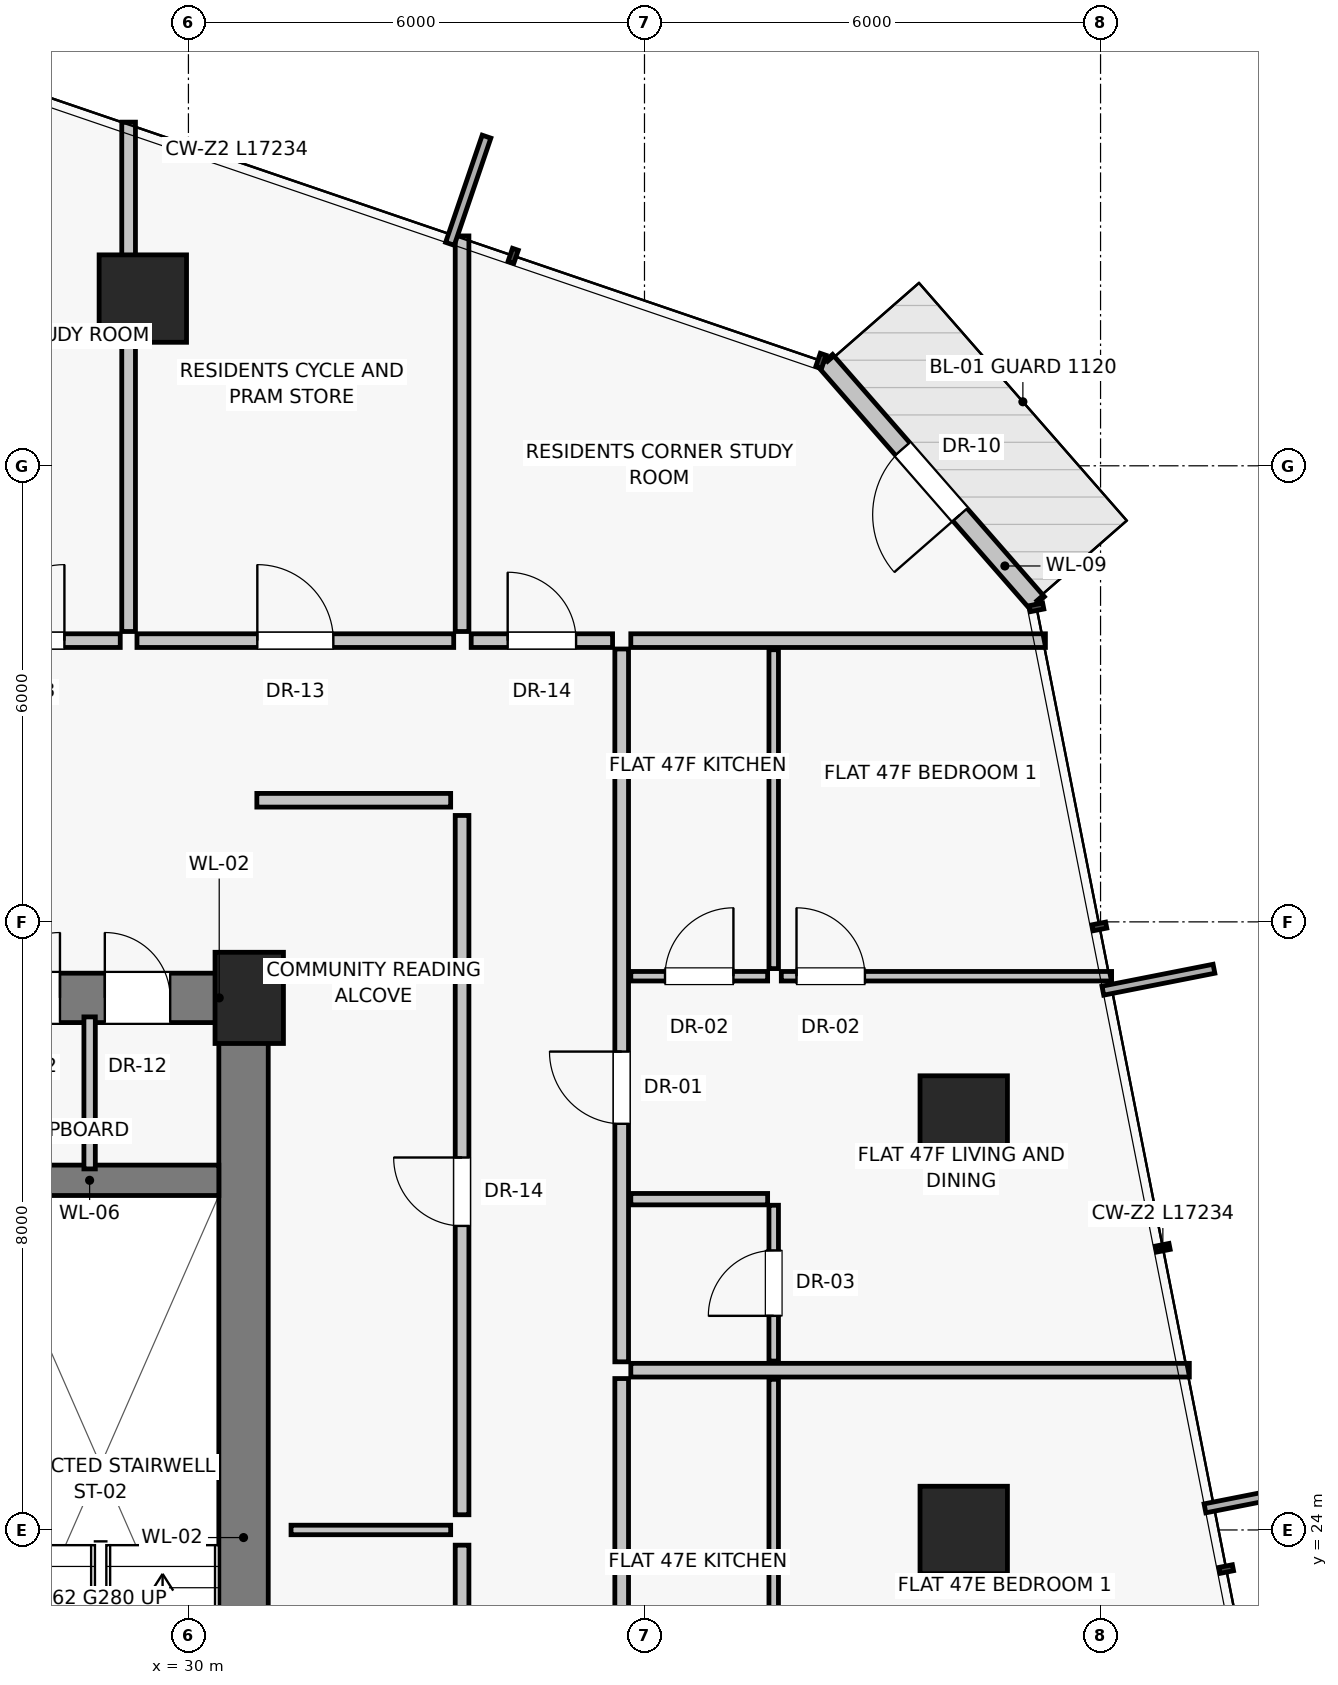
"""IFC4 building model, lengths in metres.
Left out: names, types, materials, properties, quantities, classifications, styles, units other than length and angle.
Written with IfcOpenShell. Run it as: python <this file> out.ifc"""

import sys

from ifc_helpers import new_model, si_unit, direction, frame, frame_2d, origin, origin_2d, place, context, subcontext, project, spatial, rectangle, extrude, source, transform, mapped, element, fill, save


model = new_model("IFC4")
c1 = context("Model", 3, precision=1e-05, world=origin(), true_north=direction((0.0, 1.0)))
c2 = subcontext(c1, "Body", "Model", "MODEL_VIEW")
j1 = project(units=[si_unit("LENGTHUNIT", "METRE"), si_unit("PLANEANGLEUNIT", "RADIAN")], contexts=[c1])
p1 = place(None, origin())
s1 = spatial("IfcSite", under=j1, at=p1, CompositionType="ELEMENT")
p2 = place(p1, origin())
s2 = spatial("IfcBuilding", under=s1, at=p2, CompositionType="ELEMENT")
p3 = place(p2, frame((0.0, 0.0, 166.3)))
s3 = spatial("IfcBuildingStorey", under=s2, at=p3, CompositionType="ELEMENT", Elevation=166.3)
p4 = place(p3, frame((30.8, 31.0, 0.0), z_axis=(0.0, 0.0, 1.0), x_axis=(1.0, 0.0, 0.0)))
e1 = element("IfcColumn", 1, at=p4, inside=s3, PredefinedType="PILASTER", context=c2, shape_type="SweptSolid", body=[
    extrude(rectangle(XDim=0.9, YDim=1.2, at=origin_2d()), origin(), (0.0, 0.0, 1.0), 3.25),
])
for number, where, z_axis, x_axis in (
    (2, (40.2, 24.0, 0.0), (0.0, 0.0, 1.0), (1.0, 0.0, 0.0)),
    (3, (40.2, 29.4, 0.0), (0.0, 0.0, 1.0), (1.0, 0.0, 0.0)),
    (4, (29.4, 40.2, 0.0), (0.0, 0.0, 1.0), (1.0, 0.0, 0.0)),
):
    element("IfcColumn", number, at=place(p3, frame(where, z_axis=z_axis, x_axis=x_axis)), inside=s3, PredefinedType="COLUMN", context=c2, shape_type="SweptSolid", body=[
        extrude(rectangle(XDim=1.15, YDim=1.15, at=origin_2d()), origin(), (0.0, 0.0, 1.0), 3.25),
    ])
p5 = place(p3, frame((41.167, 36.196, 0.0), z_axis=(0.0, 0.0, 1.0), x_axis=(-0.658137038382, 0.752898159587, 0.0)))
e5 = element("IfcWall", 5, at=p5, inside=s3, PredefinedType="SOLIDWALL", context=c2, shape_type="SweptSolid", body=[
    extrude(rectangle(XDim=4.233, YDim=0.25, at=frame_2d((2.116, 0.0))), origin(), (0.0, 0.0, 1.0), 2.93),
])
p6 = place(p5, frame((1.542, 0.0, 0.0)))
e6 = element("IfcOpeningElement", 6, at=p6, cuts=e5, PredefinedType="OPENING", context=c2, shape_type="SweptSolid", body=[
    extrude(rectangle(XDim=1.15, YDim=2.25, at=frame_2d((0.575, 1.125))), frame((0.0, 0.135, 0.0), z_axis=(0.0, -1.0, 0.0), x_axis=(1.0, 0.0, 0.0)), (0.0, 0.0, 1.0), 0.27),
])
p7 = place(p3, frame((30.725, 16.8, 0.0), z_axis=(0.0, 0.0, 1.0), x_axis=(0.0, 1.0, 0.0)))
e7 = element("IfcWall", 7, at=p7, inside=s3, PredefinedType="SHEAR", context=c2, shape_type="SweptSolid", body=[
    extrude(rectangle(XDim=14.2, YDim=0.65, at=frame_2d((7.1, 0.0))), origin(), (0.0, 0.0, 1.0), 2.93),
])
p8 = place(p3, frame((27.0, 31.0, 0.0), z_axis=(0.0, 0.0, 1.0), x_axis=(1.0, 0.0, 0.0)))
e8 = element("IfcWall", 8, at=p8, inside=s3, PredefinedType="SHEAR", context=c2, shape_type="SweptSolid", body=[
    extrude(rectangle(XDim=3.8, YDim=0.65, at=frame_2d((1.9, 0.0))), origin(), (0.0, 0.0, 1.0), 2.93),
])
p9 = place(p8, frame((0.45, 0.0, 0.0)))
e9 = element("IfcOpeningElement", 9, at=p9, cuts=e8, PredefinedType="OPENING", context=c2, shape_type="SweptSolid", body=[
    extrude(rectangle(XDim=0.86, YDim=2.01, at=frame_2d((0.43, 1.005))), frame((0.0, 0.335, 0.0), z_axis=(0.0, -1.0, 0.0), x_axis=(1.0, 0.0, 0.0)), (0.0, 0.0, 1.0), 0.67),
])
p10 = place(p8, frame((1.9, 0.0, 0.0)))
e10 = element("IfcOpeningElement", 10, at=p10, cuts=e8, PredefinedType="OPENING", context=c2, shape_type="SweptSolid", body=[
    extrude(rectangle(XDim=0.86, YDim=2.01, at=frame_2d((0.43, 1.005))), frame((0.0, 0.335, 0.0), z_axis=(0.0, -1.0, 0.0), x_axis=(1.0, 0.0, 0.0)), (0.0, 0.0, 1.0), 0.67),
])
p11 = place(p3, frame((27.0, 28.6, 0.0), z_axis=(0.0, 0.0, 1.0), x_axis=(1.0, 0.0, 0.0)))
e11 = element("IfcWall", 11, at=p11, inside=s3, PredefinedType="SHEAR", context=c2, shape_type="SweptSolid", body=[
    extrude(rectangle(XDim=3.4, YDim=0.4, at=frame_2d((1.7, 0.0))), origin(), (0.0, 0.0, 1.0), 2.93),
])
p12 = place(p3, frame((28.7, 28.75, 0.0), z_axis=(0.0, 0.0, 1.0), x_axis=(0.0, 1.0, 0.0)))
e12 = element("IfcWall", 12, at=p12, inside=s3, PredefinedType="PARTITIONING", context=c2, shape_type="SweptSolid", body=[
    extrude(rectangle(XDim=2.0, YDim=0.15, at=frame_2d((1.0, 0.0))), origin(), (0.0, 0.0, 1.0), 2.93),
])
p13 = place(p3, frame((33.6, 14.4, 0.0), z_axis=(0.0, 0.0, 1.0), x_axis=(0.0, 1.0, 0.0)))
e13 = element("IfcWall", 13, at=p13, inside=s3, PredefinedType="PARTITIONING", context=c2, shape_type="SweptSolid", body=[
    extrude(rectangle(XDim=9.4, YDim=0.18, at=frame_2d((4.7, 0.0))), origin(), (0.0, 0.0, 1.0), 2.93),
])
p14 = place(p13, frame((3.8, 0.0, 0.0)))
e14 = element("IfcOpeningElement", 14, at=p14, cuts=e13, PredefinedType="OPENING", context=c2, shape_type="SweptSolid", body=[
    extrude(rectangle(XDim=0.9, YDim=2.01, at=frame_2d((0.45, 1.005))), frame((0.0, 0.1, 0.0), z_axis=(0.0, -1.0, 0.0), x_axis=(1.0, 0.0, 0.0)), (0.0, 0.0, 1.0), 0.2),
])
p15 = place(p3, frame((33.6, 24.2, 0.0), z_axis=(0.0, 0.0, 1.0), x_axis=(0.0, 1.0, 0.0)))
e15 = element("IfcWall", 15, at=p15, inside=s3, PredefinedType="PARTITIONING", context=c2, shape_type="SweptSolid", body=[
    extrude(rectangle(XDim=9.2, YDim=0.18, at=frame_2d((4.6, 0.0))), origin(), (0.0, 0.0, 1.0), 2.93),
])
p16 = place(p15, frame((3.8, 0.0, 0.0)))
e16 = element("IfcOpeningElement", 16, at=p16, cuts=e15, PredefinedType="OPENING", context=c2, shape_type="SweptSolid", body=[
    extrude(rectangle(XDim=0.9, YDim=2.01, at=frame_2d((0.45, 1.005))), frame((0.0, 0.1, 0.0), z_axis=(0.0, -1.0, 0.0), x_axis=(1.0, 0.0, 0.0)), (0.0, 0.0, 1.0), 0.2),
])
p17 = place(p3, frame((31.35, 24.0, 0.0), z_axis=(0.0, 0.0, 1.0), x_axis=(1.0, 0.0, 0.0)))
e17 = element("IfcWall", 17, at=p17, inside=s3, PredefinedType="PARTITIONING", context=c2, shape_type="SweptSolid", body=[
    extrude(rectangle(XDim=2.1, YDim=0.125, at=frame_2d((1.05, 0.0))), origin(), (0.0, 0.0, 1.0), 2.93),
])
p18 = place(p3, frame((30.9, 33.6, 0.0), z_axis=(0.0, 0.0, 1.0), x_axis=(1.0, 0.0, 0.0)))
e18 = element("IfcWall", 18, at=p18, inside=s3, PredefinedType="PARTITIONING", context=c2, shape_type="SweptSolid", body=[
    extrude(rectangle(XDim=2.55, YDim=0.18, at=frame_2d((1.275, 0.0))), origin(), (0.0, 0.0, 1.0), 2.93),
])
p19 = place(p3, frame((33.6, 35.82, 0.0), z_axis=(0.0, 0.0, 1.0), x_axis=(0.0, 1.0, 0.0)))
e19 = element("IfcWall", 19, at=p19, inside=s3, PredefinedType="PARTITIONING", context=c2, shape_type="SweptSolid", body=[
    extrude(rectangle(XDim=5.204, YDim=0.18, at=frame_2d((2.602, 0.0))), origin(), (0.0, 0.0, 1.0), 2.93),
])
p20 = place(p3, frame((26.634, 35.7, 0.0), z_axis=(0.0, 0.0, 1.0), x_axis=(1.0, 0.0, 0.0)))
e20 = element("IfcWall", 20, at=p20, inside=s3, PredefinedType="PARTITIONING", context=c2, shape_type="SweptSolid", body=[
    extrude(rectangle(XDim=2.469, YDim=0.18, at=frame_2d((1.234, 0.0))), origin(), (0.0, 0.0, 1.0), 2.51),
])
p21 = place(p20, frame((0.735, 0.0, 0.0)))
e21 = element("IfcOpeningElement", 21, at=p21, cuts=e20, PredefinedType="OPENING", context=c2, shape_type="SweptSolid", body=[
    extrude(rectangle(XDim=1.0, YDim=2.01, at=frame_2d((0.5, 1.005))), frame((0.0, 0.1, 0.0), z_axis=(0.0, -1.0, 0.0), x_axis=(1.0, 0.0, 0.0)), (0.0, 0.0, 1.0), 0.2),
])
p22 = place(p3, frame((29.323, 35.7, 0.0), z_axis=(0.0, 0.0, 1.0), x_axis=(1.0, 0.0, 0.0)))
e22 = element("IfcWall", 22, at=p22, inside=s3, PredefinedType="PARTITIONING", context=c2, shape_type="SweptSolid", body=[
    extrude(rectangle(XDim=4.167, YDim=0.18, at=frame_2d((2.083, 0.0))), origin(), (0.0, 0.0, 1.0), 2.51),
])
p23 = place(p22, frame((1.583, 0.0, 0.0)))
e23 = element("IfcOpeningElement", 23, at=p23, cuts=e22, PredefinedType="OPENING", context=c2, shape_type="SweptSolid", body=[
    extrude(rectangle(XDim=1.0, YDim=2.01, at=frame_2d((0.5, 1.005))), frame((0.0, 0.1, 0.0), z_axis=(0.0, -1.0, 0.0), x_axis=(1.0, 0.0, 0.0)), (0.0, 0.0, 1.0), 0.2),
])
p24 = place(p3, frame((29.213, 35.82, 0.0), z_axis=(0.0, 0.0, 1.0), x_axis=(0.0, 1.0, 0.0)))
e24 = element("IfcWall", 24, at=p24, inside=s3, PredefinedType="PARTITIONING", context=c2, shape_type="SweptSolid", body=[
    extrude(rectangle(XDim=6.701, YDim=0.18, at=frame_2d((3.351, 0.0))), origin(), (0.0, 0.0, 1.0), 2.308),
])
p25 = place(p3, frame((35.82, 35.7, 0.0), z_axis=(0.0, 0.0, 1.0), x_axis=(1.0, 0.0, 0.0)))
e25 = element("IfcWall", 25, at=p25, inside=s3, PredefinedType="PARTITIONING", context=c2, shape_type="SweptSolid", body=[
    extrude(rectangle(XDim=5.455, YDim=0.18, at=frame_2d((2.727, 0.0))), origin(), (0.0, 0.0, 1.0), 2.93),
])
p26 = place(p3, frame((35.7, 12.21, 0.0), z_axis=(0.0, 0.0, 1.0), x_axis=(0.0, 1.0, 0.0)))
e26 = element("IfcWall", 26, at=p26, inside=s3, PredefinedType="PARTITIONING", context=c2, shape_type="SweptSolid", body=[
    extrude(rectangle(XDim=13.782, YDim=0.18, at=frame_2d((6.891, 0.0))), origin(), (0.0, 0.0, 1.0), 2.51),
])
p27 = place(p26, frame((4.46, 0.0, 0.0)))
e27 = element("IfcOpeningElement", 27, at=p27, cuts=e26, PredefinedType="OPENING", context=c2, shape_type="SweptSolid", body=[
    extrude(rectangle(XDim=0.95, YDim=2.02, at=frame_2d((0.475, 1.01))), frame((0.0, 0.1, 0.0), z_axis=(0.0, -1.0, 0.0), x_axis=(1.0, 0.0, 0.0)), (0.0, 0.0, 1.0), 0.2),
])
p28 = place(p3, frame((37.7, 20.041, 0.0), z_axis=(0.0, 0.0, 1.0), x_axis=(0.0, 1.0, 0.0)))
e28 = element("IfcWall", 28, at=p28, inside=s3, PredefinedType="PARTITIONING", context=c2, shape_type="SweptSolid", body=[
    extrude(rectangle(XDim=5.941, YDim=0.125, at=frame_2d((2.97, 0.0))), origin(), (0.0, 0.0, 1.0), 2.93),
])
p29 = place(p3, frame((35.82, 26.102, 0.0), z_axis=(0.0, 0.0, 1.0), x_axis=(1.0, 0.0, 0.0)))
e29 = element("IfcWall", 29, at=p29, inside=s3, PredefinedType="PARTITIONING", context=c2, shape_type="SweptSolid", body=[
    extrude(rectangle(XDim=7.348, YDim=0.18, at=frame_2d((3.674, 0.0))), origin(), (0.0, 0.0, 1.0), 2.93),
])
p30 = place(p3, frame((35.7, 26.212, 0.0), z_axis=(0.0, 0.0, 1.0), x_axis=(0.0, 1.0, 0.0)))
e30 = element("IfcWall", 30, at=p30, inside=s3, PredefinedType="PARTITIONING", context=c2, shape_type="SweptSolid", body=[
    extrude(rectangle(XDim=9.378, YDim=0.18, at=frame_2d((4.689, 0.0))), origin(), (0.0, 0.0, 1.0), 2.51),
])
p31 = place(p30, frame((3.132, 0.0, 0.0)))
e31 = element("IfcOpeningElement", 31, at=p31, cuts=e30, PredefinedType="OPENING", context=c2, shape_type="SweptSolid", body=[
    extrude(rectangle(XDim=0.95, YDim=2.02, at=frame_2d((0.475, 1.01))), frame((0.0, 0.1, 0.0), z_axis=(0.0, -1.0, 0.0), x_axis=(1.0, 0.0, 0.0)), (0.0, 0.0, 1.0), 0.2),
])
p32 = place(p3, frame((35.82, 28.352, 0.0), z_axis=(0.0, 0.0, 1.0), x_axis=(1.0, 0.0, 0.0)))
e32 = element("IfcWall", 32, at=p32, inside=s3, PredefinedType="PARTITIONING", context=c2, shape_type="SweptSolid", body=[
    extrude(rectangle(XDim=1.8, YDim=0.15, at=frame_2d((0.9, 0.0))), origin(), (0.0, 0.0, 1.0), 2.93),
])
p33 = place(p3, frame((37.7, 26.222, 0.0), z_axis=(0.0, 0.0, 1.0), x_axis=(0.0, 1.0, 0.0)))
e33 = element("IfcWall", 33, at=p33, inside=s3, PredefinedType="PARTITIONING", context=c2, shape_type="SweptSolid", body=[
    extrude(rectangle(XDim=2.05, YDim=0.125, at=frame_2d((1.025, 0.0))), origin(), (0.0, 0.0, 1.0), 2.93),
])
p34 = place(p33, frame((0.595, 0.0, 0.0)))
e34 = element("IfcOpeningElement", 34, at=p34, cuts=e33, PredefinedType="OPENING", context=c2, shape_type="SweptSolid", body=[
    extrude(rectangle(XDim=0.86, YDim=2.01, at=frame_2d((0.43, 1.005))), frame((0.0, 0.073, 0.0), z_axis=(0.0, -1.0, 0.0), x_axis=(1.0, 0.0, 0.0)), (0.0, 0.0, 1.0), 0.145),
])
p35 = place(p3, frame((35.82, 31.285, 0.0), z_axis=(0.0, 0.0, 1.0), x_axis=(1.0, 0.0, 0.0)))
e35 = element("IfcWall", 35, at=p35, inside=s3, PredefinedType="PARTITIONING", context=c2, shape_type="SweptSolid", body=[
    extrude(rectangle(XDim=1.8, YDim=0.125, at=frame_2d((0.9, 0.0))), origin(), (0.0, 0.0, 1.0), 2.93),
])
p36 = place(p35, frame((0.45, 0.0, 0.0)))
e36 = element("IfcOpeningElement", 36, at=p36, cuts=e35, PredefinedType="OPENING", context=c2, shape_type="SweptSolid", body=[
    extrude(rectangle(XDim=0.9, YDim=2.01, at=frame_2d((0.45, 1.005))), frame((0.0, 0.073, 0.0), z_axis=(0.0, -1.0, 0.0), x_axis=(1.0, 0.0, 0.0)), (0.0, 0.0, 1.0), 0.145),
])
p37 = place(p3, frame((37.7, 31.385, 0.0), z_axis=(0.0, 0.0, 1.0), x_axis=(0.0, 1.0, 0.0)))
e37 = element("IfcWall", 37, at=p37, inside=s3, PredefinedType="PARTITIONING", context=c2, shape_type="SweptSolid", body=[
    extrude(rectangle(XDim=4.195, YDim=0.125, at=frame_2d((2.098, 0.0))), origin(), (0.0, 0.0, 1.0), 2.93),
])
p38 = place(p3, frame((37.8, 31.285, 0.0), z_axis=(0.0, 0.0, 1.0), x_axis=(1.0, 0.0, 0.0)))
e38 = element("IfcWall", 38, at=p38, inside=s3, PredefinedType="PARTITIONING", context=c2, shape_type="SweptSolid", body=[
    extrude(rectangle(XDim=4.345, YDim=0.125, at=frame_2d((2.173, 0.0))), origin(), (0.0, 0.0, 1.0), 2.93),
])
p39 = place(p38, frame((0.2, 0.0, 0.0)))
e39 = element("IfcOpeningElement", 39, at=p39, cuts=e38, PredefinedType="OPENING", context=c2, shape_type="SweptSolid", body=[
    extrude(rectangle(XDim=0.9, YDim=2.01, at=frame_2d((0.45, 1.005))), frame((0.0, 0.073, 0.0), z_axis=(0.0, -1.0, 0.0), x_axis=(1.0, 0.0, 0.0)), (0.0, 0.0, 1.0), 0.145),
])
p40 = place(p3, frame((33.72, 35.7, 0.0), z_axis=(0.0, 0.0, 1.0), x_axis=(1.0, 0.0, 0.0)))
e40 = element("IfcWall", 40, at=p40, inside=s3, PredefinedType="PARTITIONING", context=c2, shape_type="SweptSolid", body=[
    extrude(rectangle(XDim=1.86, YDim=0.18, at=frame_2d((0.93, 0.0))), origin(), (0.0, 0.0, 1.0), 2.93),
])
p41 = place(p40, frame((0.48, 0.0, 0.0)))
e41 = element("IfcOpeningElement", 41, at=p41, cuts=e40, PredefinedType="OPENING", context=c2, shape_type="SweptSolid", body=[
    extrude(rectangle(XDim=0.9, YDim=2.01, at=frame_2d((0.45, 1.005))), frame((0.0, 0.1, 0.0), z_axis=(0.0, -1.0, 0.0), x_axis=(1.0, 0.0, 0.0)), (0.0, 0.0, 1.0), 0.2),
])
m1 = source(origin(), c2, "Body", "SweptSolid", [
    extrude(rectangle(XDim=1.15, YDim=2.25, at=frame_2d((0.575, 1.125))), frame((0.0, 0.025, 0.0), z_axis=(0.0, -1.0, 0.0), x_axis=(1.0, 0.0, 0.0)), (0.0, 0.0, 1.0), 0.05),
])
p42 = place(p6, frame((1.15, 0.0, 0.0), z_axis=(0.0, 0.0, 1.0), x_axis=(-1.0, 0.0, 0.0)))
e42 = element("IfcDoor", 42, at=p42, inside=s3, OperationType="SINGLE_SWING_LEFT", PredefinedType="DOOR", context=c2, shape_type="MappedRepresentation", body=[
    mapped(m1, transform((0.0, 0.0, 0.0), scale=1.0)),
])
fill(e6, e42)
m2 = source(origin(), c2, "Body", "SweptSolid", [
    extrude(rectangle(XDim=0.86, YDim=2.01, at=frame_2d((0.43, 1.005))), frame((0.0, 0.025, 0.0), z_axis=(0.0, -1.0, 0.0), x_axis=(1.0, 0.0, 0.0)), (0.0, 0.0, 1.0), 0.05),
])
p43 = place(p9, origin())
e43 = element("IfcDoor", 43, at=p43, inside=s3, OperationType="SINGLE_SWING_RIGHT", PredefinedType="DOOR", context=c2, shape_type="MappedRepresentation", body=[
    mapped(m2, transform((0.0, 0.0, 0.0), scale=1.0)),
])
fill(e9, e43)
p44 = place(p10, origin())
e44 = element("IfcDoor", 44, at=p44, inside=s3, OperationType="SINGLE_SWING_LEFT", PredefinedType="DOOR", context=c2, shape_type="MappedRepresentation", body=[
    mapped(m2, transform((0.0, 0.0, 0.0), scale=1.0)),
])
fill(e10, e44)
m3 = source(origin(), c2, "Body", "SweptSolid", [
    extrude(rectangle(XDim=0.9, YDim=2.01, at=frame_2d((0.45, 1.005))), frame((0.0, 0.025, 0.0), z_axis=(0.0, -1.0, 0.0), x_axis=(1.0, 0.0, 0.0)), (0.0, 0.0, 1.0), 0.05),
])
p45 = place(p16, origin())
e45 = element("IfcDoor", 45, at=p45, inside=s3, OperationType="SINGLE_SWING_RIGHT", PredefinedType="DOOR", context=c2, shape_type="MappedRepresentation", body=[
    mapped(m3, transform((0.0, 0.0, 0.0), scale=1.0)),
])
fill(e16, e45)
m4 = source(origin(), c2, "Body", "SweptSolid", [
    extrude(rectangle(XDim=1.0, YDim=2.01, at=frame_2d((0.5, 1.005))), frame((0.0, 0.025, 0.0), z_axis=(0.0, -1.0, 0.0), x_axis=(1.0, 0.0, 0.0)), (0.0, 0.0, 1.0), 0.05),
])
p46 = place(p21, origin())
e46 = element("IfcDoor", 46, at=p46, inside=s3, OperationType="SINGLE_SWING_RIGHT", PredefinedType="DOOR", context=c2, shape_type="MappedRepresentation", body=[
    mapped(m4, transform((0.0, 0.0, 0.0), scale=1.0)),
])
fill(e21, e46)
p47 = place(p23, origin())
e47 = element("IfcDoor", 47, at=p47, inside=s3, OperationType="SINGLE_SWING_LEFT", PredefinedType="DOOR", context=c2, shape_type="MappedRepresentation", body=[
    mapped(m4, transform((0.0, 0.0, 0.0), scale=1.0)),
])
fill(e23, e47)
m5 = source(origin(), c2, "Body", "SweptSolid", [
    extrude(rectangle(XDim=0.95, YDim=2.02, at=frame_2d((0.475, 1.01))), frame((0.0, 0.025, 0.0), z_axis=(0.0, -1.0, 0.0), x_axis=(1.0, 0.0, 0.0)), (0.0, 0.0, 1.0), 0.05),
])
p48 = place(p31, origin())
e48 = element("IfcDoor", 48, at=p48, inside=s3, OperationType="SINGLE_SWING_RIGHT", PredefinedType="DOOR", context=c2, shape_type="MappedRepresentation", body=[
    mapped(m5, transform((0.0, 0.0, 0.0), scale=1.0)),
])
fill(e31, e48)
p49 = place(p34, origin())
e49 = element("IfcDoor", 49, at=p49, inside=s3, OperationType="SINGLE_SWING_LEFT", PredefinedType="DOOR", context=c2, shape_type="MappedRepresentation", body=[
    mapped(m2, transform((0.0, 0.0, 0.0), scale=1.0)),
])
fill(e34, e49)
p50 = place(p36, origin())
e50 = element("IfcDoor", 50, at=p50, inside=s3, OperationType="SINGLE_SWING_RIGHT", PredefinedType="DOOR", context=c2, shape_type="MappedRepresentation", body=[
    mapped(m3, transform((0.0, 0.0, 0.0), scale=1.0)),
])
fill(e36, e50)
p51 = place(p39, origin())
e51 = element("IfcDoor", 51, at=p51, inside=s3, OperationType="SINGLE_SWING_LEFT", PredefinedType="DOOR", context=c2, shape_type="MappedRepresentation", body=[
    mapped(m3, transform((0.0, 0.0, 0.0), scale=1.0)),
])
fill(e39, e51)
p52 = place(p41, origin())
e52 = element("IfcDoor", 52, at=p52, inside=s3, OperationType="SINGLE_SWING_LEFT", PredefinedType="DOOR", context=c2, shape_type="MappedRepresentation", body=[
    mapped(m3, transform((0.0, 0.0, 0.0), scale=1.0)),
])
fill(e41, e52)
save(model, sys.argv[1])
